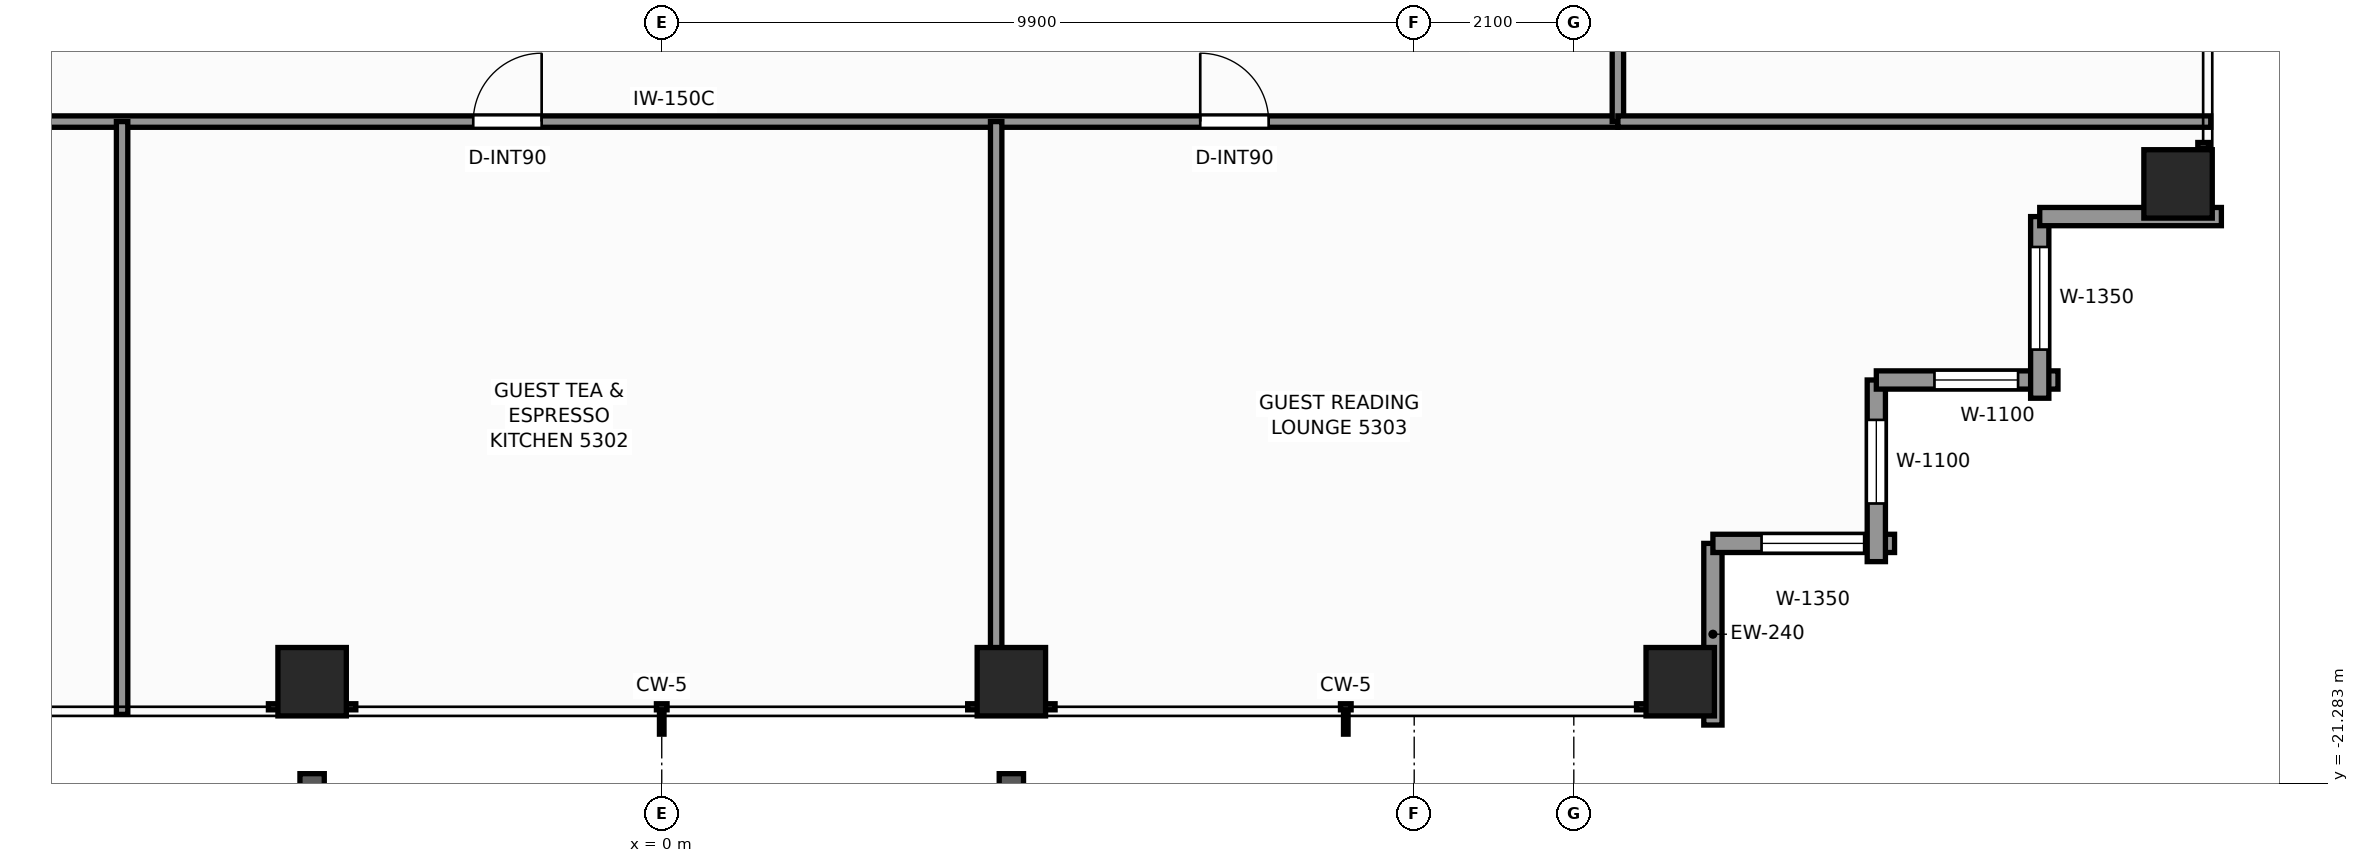
"""IFC4 building model, lengths in metres.
Left out: names, types, materials, properties, quantities, classifications, styles, units other than length and angle.
Written with IfcOpenShell. Run it as: python <this file> out.ifc"""

import sys

from ifc_helpers import new_model, si_unit, direction, frame, frame_2d, origin, origin_2d, place, context, subcontext, project, spatial, rectangle, extrude, element, fill, save


model = new_model("IFC4")
c1 = context("Model", 3, precision=1e-05, world=origin(), true_north=direction((0.0, 1.0)))
c2 = subcontext(c1, "Body", "Model", "MODEL_VIEW")
j1 = project(units=[si_unit("LENGTHUNIT", "METRE"), si_unit("PLANEANGLEUNIT", "RADIAN")], contexts=[c1])
p1 = place(None, origin())
s1 = spatial("IfcSite", under=j1, at=p1, CompositionType="ELEMENT")
p2 = place(p1, origin())
s2 = spatial("IfcBuilding", under=s1, at=p2, CompositionType="ELEMENT")
p3 = place(p2, frame((0.0, 0.0, 183.3)))
s3 = spatial("IfcBuildingStorey", under=s2, at=p3, CompositionType="ELEMENT", Elevation=183.3)
for number, where, z_axis, x_axis in (
    (1, (-4.6, -19.95, 0.0), (0.0, 0.0, 1.0), (1.0, 0.0, 0.0)),
    (2, (4.6, -19.95, 0.0), (0.0, 0.0, 1.0), (1.0, 0.0, 0.0)),
    (3, (13.4, -19.95, 0.0), (0.0, 0.0, 1.0), (1.0, 0.0, 0.0)),
    (4, (19.95, -13.4, 0.0), (0.0, 0.0, 1.0), (1.0, 0.0, 0.0)),
):
    element("IfcColumn", number, at=place(p3, frame(where, z_axis=z_axis, x_axis=x_axis)), inside=s3, PredefinedType="COLUMN", context=c2, shape_type="SweptSolid", body=[
        extrude(rectangle(XDim=0.9, YDim=0.9, at=origin_2d()), origin(), (0.0, 0.0, 1.0), 3.3),
    ])
p4 = place(p3, frame((13.83, -18.13, 0.0), z_axis=(0.0, 0.0, 1.0), x_axis=(0.0, -1.0, 0.0)))
e5 = element("IfcWall", 5, at=p4, inside=s3, PredefinedType="STANDARD", context=c2, shape_type="SweptSolid", body=[
    extrude(rectangle(XDim=2.39, YDim=0.24, at=frame_2d((1.195, 0.0))), origin(), (0.0, 0.0, 1.0), 2.463),
])
p5 = place(p3, frame((16.22, -18.13, 0.0), z_axis=(0.0, 0.0, 1.0), x_axis=(-1.0, 0.0, 0.0)))
e6 = element("IfcWall", 6, at=p5, inside=s3, PredefinedType="STANDARD", context=c2, shape_type="SweptSolid", body=[
    extrude(rectangle(XDim=2.39, YDim=0.24, at=frame_2d((1.195, 0.0))), origin(), (0.0, 0.0, 1.0), 2.463),
])
p6 = place(p5, frame((0.4, 0.0, 0.65)))
e7 = element("IfcOpeningElement", 7, at=p6, cuts=e6, PredefinedType="OPENING", context=c2, shape_type="SweptSolid", body=[
    extrude(rectangle(XDim=1.35, YDim=1.55, at=frame_2d((0.675, 0.775))), frame((0.0, 0.13, 0.0), z_axis=(0.0, -1.0, 0.0), x_axis=(1.0, 0.0, 0.0)), (0.0, 0.0, 1.0), 0.26),
])
p7 = place(p3, frame((15.98, -15.98, 0.0), z_axis=(0.0, 0.0, 1.0), x_axis=(0.0, -1.0, 0.0)))
e8 = element("IfcWall", 8, at=p7, inside=s3, PredefinedType="STANDARD", context=c2, shape_type="SweptSolid", body=[
    extrude(rectangle(XDim=2.39, YDim=0.24, at=frame_2d((1.195, 0.0))), origin(), (0.0, 0.0, 1.0), 2.463),
])
p8 = place(p7, frame((0.525, 0.0, 0.65)))
e9 = element("IfcOpeningElement", 9, at=p8, cuts=e8, PredefinedType="OPENING", context=c2, shape_type="SweptSolid", body=[
    extrude(rectangle(XDim=1.1, YDim=1.45, at=frame_2d((0.55, 0.725))), frame((0.0, 0.13, 0.0), z_axis=(0.0, -1.0, 0.0), x_axis=(1.0, 0.0, 0.0)), (0.0, 0.0, 1.0), 0.26),
])
p9 = place(p3, frame((18.37, -15.98, 0.0), z_axis=(0.0, 0.0, 1.0), x_axis=(-1.0, 0.0, 0.0)))
e10 = element("IfcWall", 10, at=p9, inside=s3, PredefinedType="STANDARD", context=c2, shape_type="SweptSolid", body=[
    extrude(rectangle(XDim=2.39, YDim=0.24, at=frame_2d((1.195, 0.0))), origin(), (0.0, 0.0, 1.0), 2.463),
])
p10 = place(p9, frame((0.525, 0.0, 0.65)))
e11 = element("IfcOpeningElement", 11, at=p10, cuts=e10, PredefinedType="OPENING", context=c2, shape_type="SweptSolid", body=[
    extrude(rectangle(XDim=1.1, YDim=1.45, at=frame_2d((0.55, 0.725))), frame((0.0, 0.13, 0.0), z_axis=(0.0, -1.0, 0.0), x_axis=(1.0, 0.0, 0.0)), (0.0, 0.0, 1.0), 0.26),
])
p11 = place(p3, frame((18.13, -13.83, 0.0), z_axis=(0.0, 0.0, 1.0), x_axis=(0.0, -1.0, 0.0)))
e12 = element("IfcWall", 12, at=p11, inside=s3, PredefinedType="STANDARD", context=c2, shape_type="SweptSolid", body=[
    extrude(rectangle(XDim=2.39, YDim=0.24, at=frame_2d((1.195, 0.0))), origin(), (0.0, 0.0, 1.0), 2.463),
])
p12 = place(p11, frame((0.4, 0.0, 0.65)))
e13 = element("IfcOpeningElement", 13, at=p12, cuts=e12, PredefinedType="OPENING", context=c2, shape_type="SweptSolid", body=[
    extrude(rectangle(XDim=1.35, YDim=1.55, at=frame_2d((0.675, 0.775))), frame((0.0, 0.13, 0.0), z_axis=(0.0, -1.0, 0.0), x_axis=(1.0, 0.0, 0.0)), (0.0, 0.0, 1.0), 0.26),
])
p13 = place(p3, frame((20.52, -13.83, 0.0), z_axis=(0.0, 0.0, 1.0), x_axis=(-1.0, 0.0, 0.0)))
e14 = element("IfcWall", 14, at=p13, inside=s3, PredefinedType="STANDARD", context=c2, shape_type="SweptSolid", body=[
    extrude(rectangle(XDim=2.39, YDim=0.24, at=frame_2d((1.195, 0.0))), origin(), (0.0, 0.0, 1.0), 2.463),
])
p14 = place(p3, frame((-12.26, -12.58, 0.0), z_axis=(0.0, 0.0, 1.0), x_axis=(1.0, 0.0, 0.0)))
e15 = element("IfcWall", 15, at=p14, inside=s3, PredefinedType="PARTITIONING", context=c2, shape_type="SweptSolid", body=[
    extrude(rectangle(XDim=24.84, YDim=0.15, at=frame_2d((12.42, 0.0))), origin(), (0.0, 0.0, 1.0), 2.369),
])
p15 = place(p14, frame((3.203, 0.0, 0.0)))
e16 = element("IfcOpeningElement", 16, at=p15, cuts=e15, PredefinedType="OPENING", context=c2, shape_type="SweptSolid", body=[
    extrude(rectangle(XDim=0.9, YDim=2.06, at=frame_2d((0.45, 1.03))), frame((0.0, 0.085, 0.0), z_axis=(0.0, -1.0, 0.0), x_axis=(1.0, 0.0, 0.0)), (0.0, 0.0, 1.0), 0.17),
])
p16 = place(p14, frame((9.78, 0.0, 0.0)))
e17 = element("IfcOpeningElement", 17, at=p16, cuts=e15, PredefinedType="OPENING", context=c2, shape_type="SweptSolid", body=[
    extrude(rectangle(XDim=0.9, YDim=2.06, at=frame_2d((0.45, 1.03))), frame((0.0, 0.085, 0.0), z_axis=(0.0, -1.0, 0.0), x_axis=(1.0, 0.0, 0.0)), (0.0, 0.0, 1.0), 0.17),
])
p17 = place(p14, frame((19.345, 0.0, 0.0)))
e18 = element("IfcOpeningElement", 18, at=p17, cuts=e15, PredefinedType="OPENING", context=c2, shape_type="SweptSolid", body=[
    extrude(rectangle(XDim=0.9, YDim=2.06, at=frame_2d((0.45, 1.03))), frame((0.0, 0.085, 0.0), z_axis=(0.0, -1.0, 0.0), x_axis=(1.0, 0.0, 0.0)), (0.0, 0.0, 1.0), 0.17),
])
p18 = place(p3, frame((12.58, -12.58, 0.0), z_axis=(0.0, 0.0, 1.0), x_axis=(0.0, 1.0, 0.0)))
e19 = element("IfcWall", 19, at=p18, inside=s3, PredefinedType="PARTITIONING", context=c2, shape_type="SweptSolid", body=[
    extrude(rectangle(XDim=24.84, YDim=0.15, at=frame_2d((12.42, 0.0))), origin(), (0.0, 0.0, 1.0), 2.369),
])
p19 = place(p18, frame((4.595, 0.0, 0.0)))
e20 = element("IfcOpeningElement", 20, at=p19, cuts=e19, PredefinedType="OPENING", context=c2, shape_type="SweptSolid", body=[
    extrude(rectangle(XDim=0.9, YDim=2.06, at=frame_2d((0.45, 1.03))), frame((0.0, 0.085, 0.0), z_axis=(0.0, -1.0, 0.0), x_axis=(1.0, 0.0, 0.0)), (0.0, 0.0, 1.0), 0.17),
])
p20 = place(p18, frame((19.665, 0.0, 0.0)))
e21 = element("IfcOpeningElement", 21, at=p20, cuts=e19, PredefinedType="OPENING", context=c2, shape_type="SweptSolid", body=[
    extrude(rectangle(XDim=0.9, YDim=2.06, at=frame_2d((0.45, 1.03))), frame((0.0, 0.085, 0.0), z_axis=(0.0, -1.0, 0.0), x_axis=(1.0, 0.0, 0.0)), (0.0, 0.0, 1.0), 0.17),
])
p21 = place(p3, frame((12.58, -12.58, 0.0), z_axis=(0.0, 0.0, 1.0), x_axis=(1.0, 0.0, 0.0)))
e22 = element("IfcWall", 22, at=p21, inside=s3, PredefinedType="PARTITIONING", context=c2, shape_type="SweptSolid", body=[
    extrude(rectangle(XDim=7.8, YDim=0.15, at=frame_2d((3.9, 0.0))), origin(), (0.0, 0.0, 1.0), 2.369),
])
p22 = place(p3, frame((-7.1, -20.38, 0.0), z_axis=(0.0, 0.0, 1.0), x_axis=(0.0, 1.0, 0.0)))
e23 = element("IfcWall", 23, at=p22, inside=s3, PredefinedType="PARTITIONING", context=c2, shape_type="SweptSolid", body=[
    extrude(rectangle(XDim=7.8, YDim=0.15, at=frame_2d((3.9, 0.0))), origin(), (0.0, 0.0, 1.0), 2.453),
])
p23 = place(p3, frame((4.4, -20.38, 0.0), z_axis=(0.0, 0.0, 1.0), x_axis=(0.0, 1.0, 0.0)))
e24 = element("IfcWall", 24, at=p23, inside=s3, PredefinedType="PARTITIONING", context=c2, shape_type="SweptSolid", body=[
    extrude(rectangle(XDim=7.8, YDim=0.15, at=frame_2d((3.9, 0.0))), origin(), (0.0, 0.0, 1.0), 2.369),
])
p24 = place(p6, origin())
e25 = element("IfcWindow", 25, at=p24, inside=s3, PartitioningType="SINGLE_PANEL", PredefinedType="WINDOW", context=c2, shape_type="SweptSolid", body=[
    extrude(rectangle(XDim=1.35, YDim=1.55, at=frame_2d((0.675, 0.775))), frame((0.0, 0.03, 0.0), z_axis=(0.0, -1.0, 0.0), x_axis=(1.0, 0.0, 0.0)), (0.0, 0.0, 1.0), 0.06),
])
fill(e7, e25)
p25 = place(p8, origin())
e26 = element("IfcWindow", 26, at=p25, inside=s3, PartitioningType="SINGLE_PANEL", PredefinedType="WINDOW", context=c2, shape_type="SweptSolid", body=[
    extrude(rectangle(XDim=1.1, YDim=1.45, at=frame_2d((0.55, 0.725))), frame((0.0, 0.03, 0.0), z_axis=(0.0, -1.0, 0.0), x_axis=(1.0, 0.0, 0.0)), (0.0, 0.0, 1.0), 0.06),
])
fill(e9, e26)
p26 = place(p10, origin())
e27 = element("IfcWindow", 27, at=p26, inside=s3, PartitioningType="SINGLE_PANEL", PredefinedType="WINDOW", context=c2, shape_type="SweptSolid", body=[
    extrude(rectangle(XDim=1.1, YDim=1.45, at=frame_2d((0.55, 0.725))), frame((0.0, 0.03, 0.0), z_axis=(0.0, -1.0, 0.0), x_axis=(1.0, 0.0, 0.0)), (0.0, 0.0, 1.0), 0.06),
])
fill(e11, e27)
p27 = place(p12, origin())
e28 = element("IfcWindow", 28, at=p27, inside=s3, PartitioningType="SINGLE_PANEL", PredefinedType="WINDOW", context=c2, shape_type="SweptSolid", body=[
    extrude(rectangle(XDim=1.35, YDim=1.55, at=frame_2d((0.675, 0.775))), frame((0.0, 0.03, 0.0), z_axis=(0.0, -1.0, 0.0), x_axis=(1.0, 0.0, 0.0)), (0.0, 0.0, 1.0), 0.06),
])
fill(e13, e28)
p28 = place(p16, origin())
e29 = element("IfcDoor", 29, at=p28, inside=s3, OperationType="SINGLE_SWING_RIGHT", PredefinedType="DOOR", context=c2, shape_type="SweptSolid", body=[
    extrude(rectangle(XDim=0.9, YDim=2.06, at=frame_2d((0.45, 1.03))), frame((0.0, 0.025, 0.0), z_axis=(0.0, -1.0, 0.0), x_axis=(1.0, 0.0, 0.0)), (0.0, 0.0, 1.0), 0.05),
])
fill(e17, e29)
p29 = place(p17, origin())
e30 = element("IfcDoor", 30, at=p29, inside=s3, OperationType="SINGLE_SWING_LEFT", PredefinedType="DOOR", context=c2, shape_type="SweptSolid", body=[
    extrude(rectangle(XDim=0.9, YDim=2.06, at=frame_2d((0.45, 1.03))), frame((0.0, 0.025, 0.0), z_axis=(0.0, -1.0, 0.0), x_axis=(1.0, 0.0, 0.0)), (0.0, 0.0, 1.0), 0.05),
])
fill(e18, e30)
save(model, sys.argv[1])
